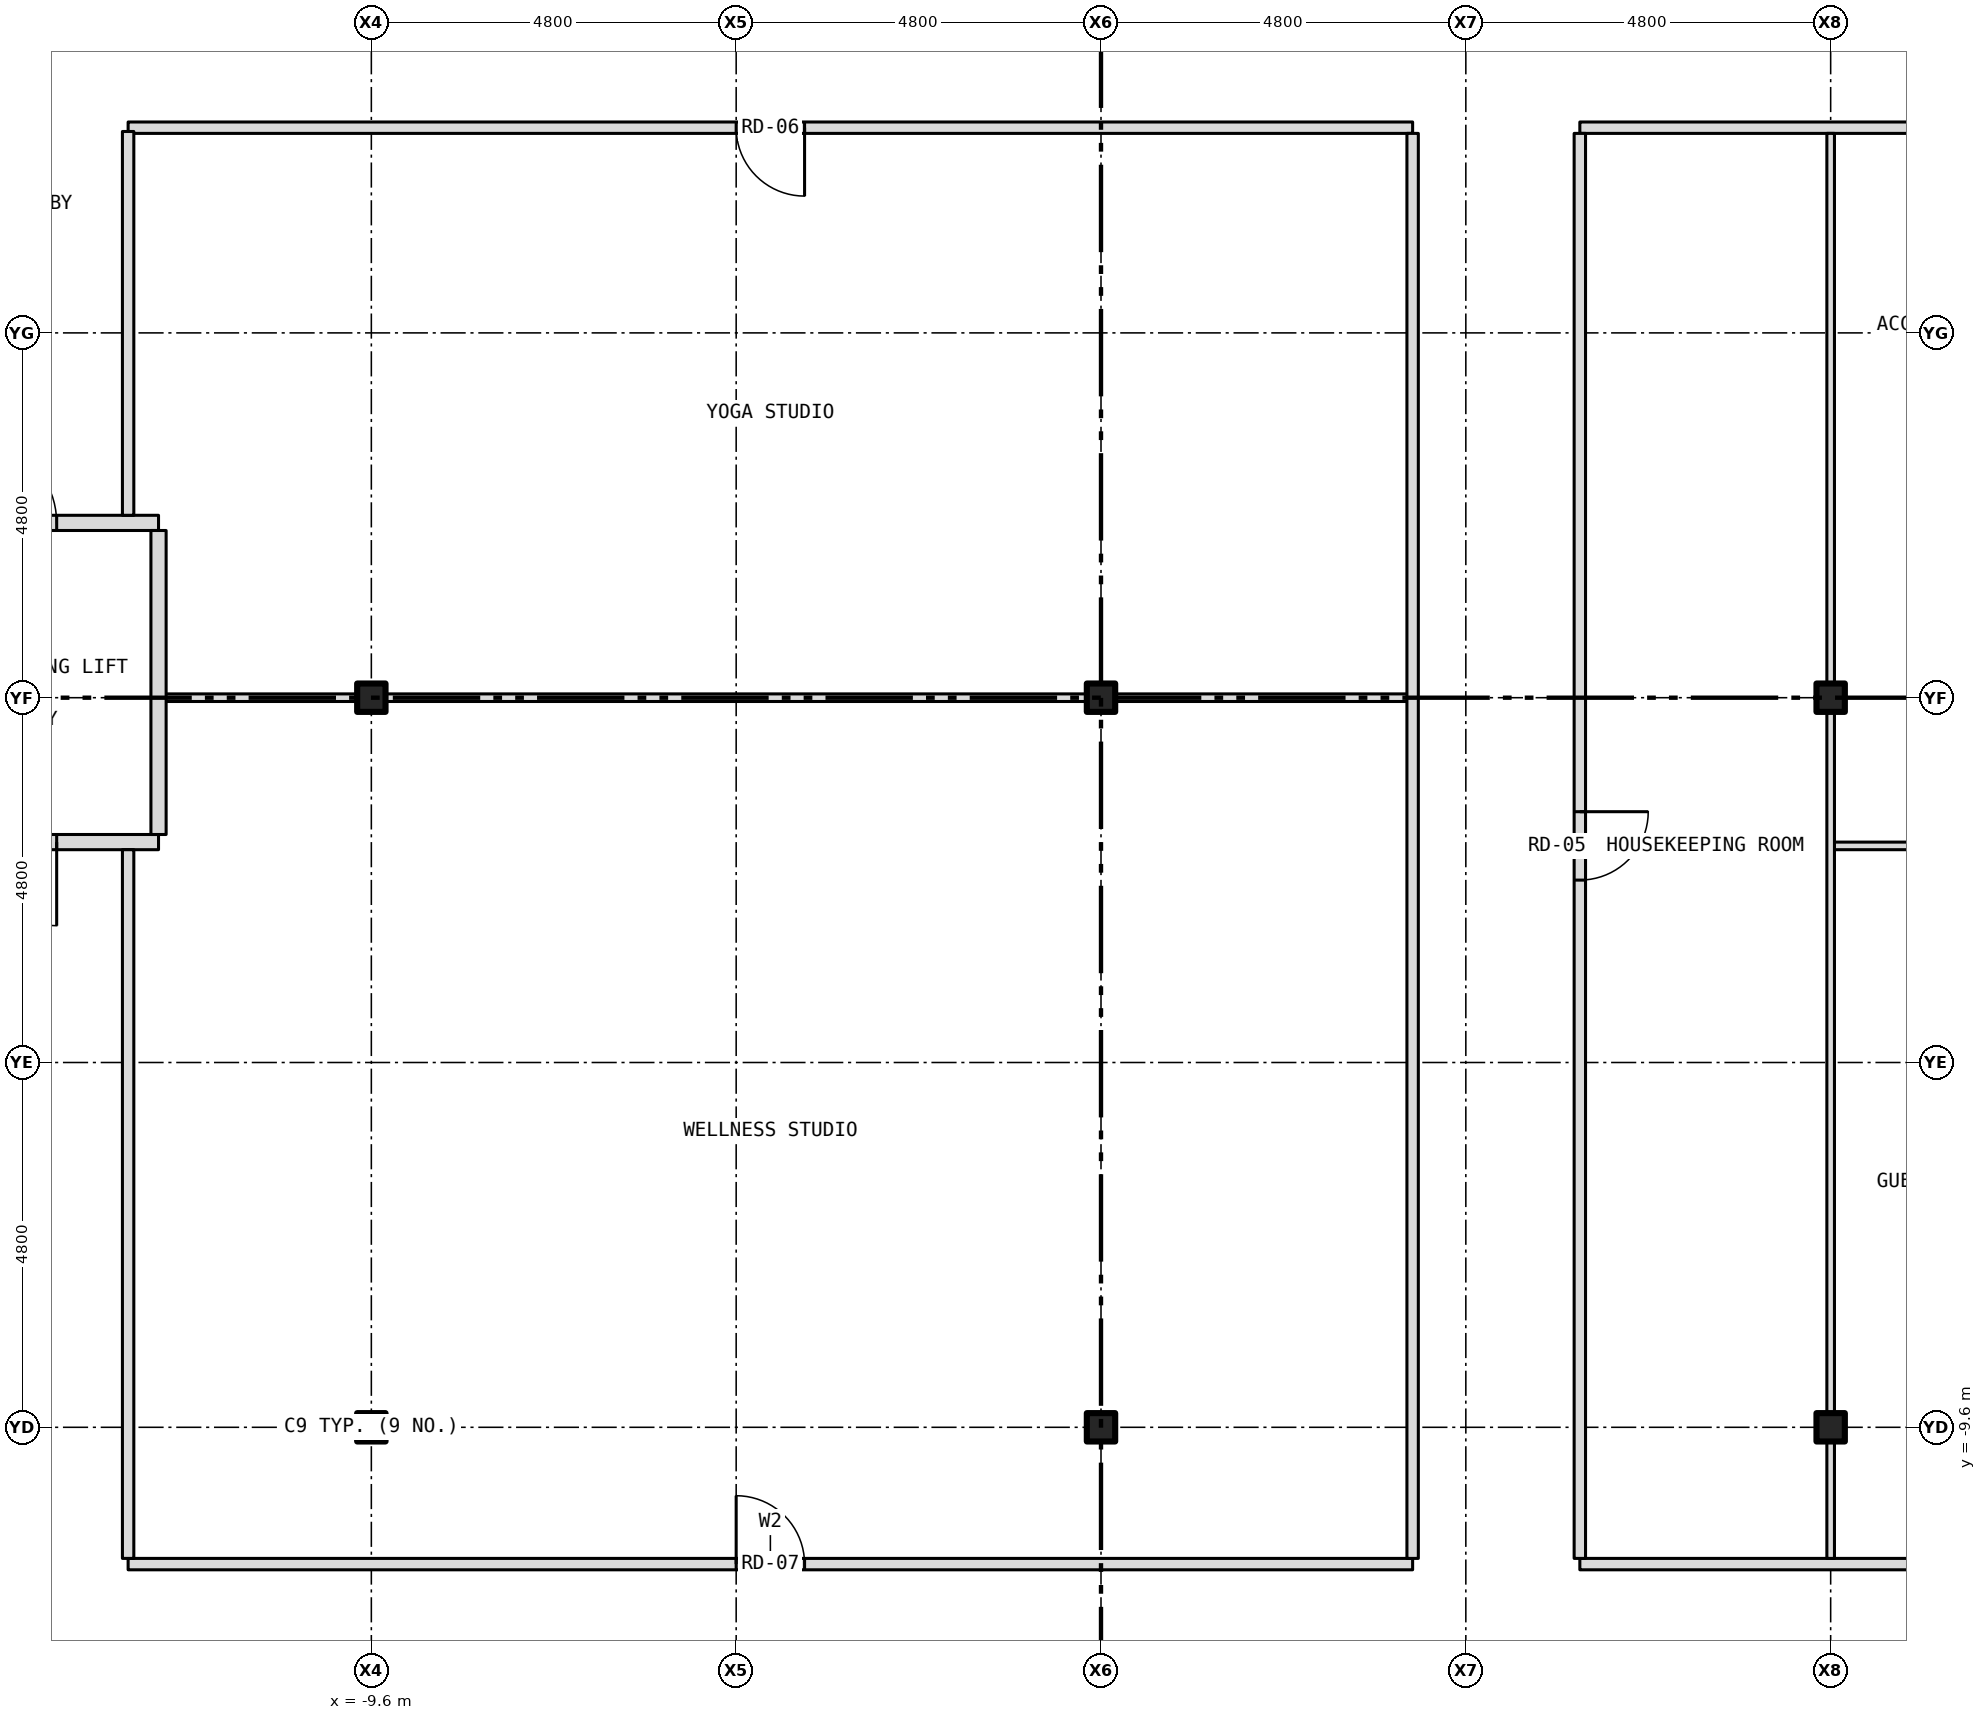
"""IFC4 building model, lengths in metres.
Left out: names, types, materials, properties, quantities, classifications, styles, units other than length and angle.
Written with IfcOpenShell. Run it as: python <this file> out.ifc"""

import sys

from ifc_helpers import new_model, si_unit, direction, frame, frame_2d, origin, origin_2d, place, context, subcontext, project, spatial, rectangle, i_section, extrude, element, fill, save


model = new_model("IFC4")
c1 = context("Model", 3, precision=1e-05, world=origin(), true_north=direction((0.0, 1.0)))
c2 = subcontext(c1, "Body", "Model", "MODEL_VIEW")
j1 = project(units=[si_unit("LENGTHUNIT", "METRE"), si_unit("PLANEANGLEUNIT", "RADIAN")], contexts=[c1])
p1 = place(None, origin())
s1 = spatial("IfcSite", under=j1, at=p1, CompositionType="ELEMENT")
p2 = place(p1, origin())
s2 = spatial("IfcBuilding", under=s1, at=p2, CompositionType="ELEMENT")
p3 = place(p2, frame((0.0, 0.0, 179.5)))
s3 = spatial("IfcBuildingStorey", under=s2, at=p3, CompositionType="ELEMENT", Elevation=179.5)
for number, where, z_axis, x_axis in (
    (1, (-9.6, -9.6, -0.15), (0.0, 0.0, 1.0), (1.0, 0.0, 0.0)),
    (2, (-9.6, 0.0, -0.15), (0.0, 0.0, 1.0), (1.0, 0.0, 0.0)),
    (3, (0.0, -9.6, -0.15), (0.0, 0.0, 1.0), (1.0, 0.0, 0.0)),
    (4, (0.0, 0.0, -0.15), (0.0, 0.0, 1.0), (1.0, 0.0, 0.0)),
    (5, (9.6, -9.6, -0.15), (0.0, 0.0, 1.0), (1.0, 0.0, 0.0)),
    (6, (9.6, 0.0, -0.15), (0.0, 0.0, 1.0), (1.0, 0.0, 0.0)),
):
    element("IfcColumn", number, at=place(p3, frame(where, z_axis=z_axis, x_axis=x_axis)), inside=s3, PredefinedType="COLUMN", context=c2, shape_type="SweptSolid", body=[
        extrude(i_section(OverallWidth=0.373, OverallDepth=0.373, WebThickness=0.016, FlangeThickness=0.026, at=origin_2d()), origin(), (0.0, 0.0, 1.0), 3.5),
    ])
p4 = place(p3, frame((-12.8, -11.4, 0.0), z_axis=(0.0, 0.0, 1.0), x_axis=(1.0, 0.0, 0.0)))
e7 = element("IfcWall", 7, at=p4, inside=s3, PredefinedType="PARTITIONING", context=c2, shape_type="SweptSolid", body=[
    extrude(rectangle(XDim=16.9, YDim=0.15, at=frame_2d((8.45, 0.0))), origin(), (0.0, 0.0, 1.0), 3.35),
])
p5 = place(p4, frame((8.0, 0.0, 0.0)))
e8 = element("IfcOpeningElement", 8, at=p5, cuts=e7, PredefinedType="OPENING", context=c2, shape_type="SweptSolid", body=[
    extrude(rectangle(XDim=0.9, YDim=2.1, at=frame_2d((0.45, 1.05))), frame((0.0, 0.087, 0.0), z_axis=(0.0, -1.0, 0.0), x_axis=(1.0, 0.0, 0.0)), (0.0, 0.0, 1.0), 0.174),
])
p6 = place(p3, frame((6.3, -11.4, 0.0), z_axis=(0.0, 0.0, 1.0), x_axis=(1.0, 0.0, 0.0)))
e9 = element("IfcWall", 9, at=p6, inside=s3, PredefinedType="PARTITIONING", context=c2, shape_type="SweptSolid", body=[
    extrude(rectangle(XDim=6.5, YDim=0.15, at=frame_2d((3.25, 0.0))), origin(), (0.0, 0.0, 1.0), 3.35),
])
p7 = place(p3, frame((9.6, -1.95, 0.0), z_axis=(0.0, 0.0, 1.0), x_axis=(1.0, 0.0, 0.0)))
e10 = element("IfcWall", 10, at=p7, inside=s3, PredefinedType="PARTITIONING", context=c2, shape_type="SweptSolid", body=[
    extrude(rectangle(XDim=3.2, YDim=0.1, at=frame_2d((1.6, 0.0))), origin(), (0.0, 0.0, 1.0), 3.35),
])
p8 = place(p3, frame((-15.68, -1.9, 0.0), z_axis=(0.0, 0.0, 1.0), x_axis=(1.0, 0.0, 0.0)))
e11 = element("IfcWall", 11, at=p8, inside=s3, PredefinedType="PARTITIONING", context=c2, shape_type="SweptSolid", body=[
    extrude(rectangle(XDim=3.28, YDim=0.2, at=frame_2d((1.64, 0.0))), origin(), (0.0, 0.0, 1.0), 3.35),
])
p9 = place(p8, frame((0.84, 0.0, 0.0)))
e12 = element("IfcOpeningElement", 12, at=p9, cuts=e11, PredefinedType="OPENING", context=c2, shape_type="SweptSolid", body=[
    extrude(rectangle(XDim=1.1, YDim=2.1, at=frame_2d((0.55, 1.05))), frame((0.0, 0.112, 0.0), z_axis=(0.0, -1.0, 0.0), x_axis=(1.0, 0.0, 0.0)), (0.0, 0.0, 1.0), 0.224),
])
p10 = place(p3, frame((-12.4, 0.0, 0.0), z_axis=(0.0, 0.0, 1.0), x_axis=(1.0, 0.0, 0.0)))
e13 = element("IfcWall", 13, at=p10, inside=s3, PredefinedType="PARTITIONING", context=c2, shape_type="SweptSolid", body=[
    extrude(rectangle(XDim=2.613, YDim=0.1, at=frame_2d((1.306, 0.0))), origin(), (0.0, 0.0, 1.0), 2.728),
])
p11 = place(p3, frame((-9.787, 0.0, 0.0), z_axis=(0.0, 0.0, 1.0), x_axis=(1.0, 0.0, 0.0)))
e14 = element("IfcWall", 14, at=p11, inside=s3, PredefinedType="PARTITIONING", context=c2, shape_type="SweptSolid", body=[
    extrude(rectangle(XDim=0.374, YDim=0.1, at=frame_2d((0.187, 0.0))), origin(), (0.0, 0.0, 1.0), 3.35),
])
p12 = place(p3, frame((-9.413, 0.0, 0.0), z_axis=(0.0, 0.0, 1.0), x_axis=(1.0, 0.0, 0.0)))
e15 = element("IfcWall", 15, at=p12, inside=s3, PredefinedType="PARTITIONING", context=c2, shape_type="SweptSolid", body=[
    extrude(rectangle(XDim=9.226, YDim=0.1, at=frame_2d((4.613, 0.0))), origin(), (0.0, 0.0, 1.0), 2.728),
])
p13 = place(p3, frame((-0.187, 0.0, 0.0), z_axis=(0.0, 0.0, 1.0), x_axis=(1.0, 0.0, 0.0)))
e16 = element("IfcWall", 16, at=p13, inside=s3, PredefinedType="PARTITIONING", context=c2, shape_type="SweptSolid", body=[
    extrude(rectangle(XDim=0.374, YDim=0.1, at=frame_2d((0.187, 0.0))), origin(), (0.0, 0.0, 1.0), 3.35),
])
p14 = place(p3, frame((0.187, 0.0, 0.0), z_axis=(0.0, 0.0, 1.0), x_axis=(1.0, 0.0, 0.0)))
e17 = element("IfcWall", 17, at=p14, inside=s3, PredefinedType="PARTITIONING", context=c2, shape_type="SweptSolid", body=[
    extrude(rectangle(XDim=3.913, YDim=0.1, at=frame_2d((1.957, 0.0))), origin(), (0.0, 0.0, 1.0), 2.728),
])
p15 = place(p3, frame((-15.68, 2.3, 0.0), z_axis=(0.0, 0.0, 1.0), x_axis=(1.0, 0.0, 0.0)))
e18 = element("IfcWall", 18, at=p15, inside=s3, PredefinedType="PARTITIONING", context=c2, shape_type="SweptSolid", body=[
    extrude(rectangle(XDim=3.28, YDim=0.2, at=frame_2d((1.64, 0.0))), origin(), (0.0, 0.0, 1.0), 3.35),
])
p16 = place(p15, frame((0.84, 0.0, 0.0)))
e19 = element("IfcOpeningElement", 19, at=p16, cuts=e18, PredefinedType="OPENING", context=c2, shape_type="SweptSolid", body=[
    extrude(rectangle(XDim=1.1, YDim=2.1, at=frame_2d((0.55, 1.05))), frame((0.0, 0.112, 0.0), z_axis=(0.0, -1.0, 0.0), x_axis=(1.0, 0.0, 0.0)), (0.0, 0.0, 1.0), 0.224),
])
p17 = place(p3, frame((-12.8, 7.5, 0.0), z_axis=(0.0, 0.0, 1.0), x_axis=(1.0, 0.0, 0.0)))
e20 = element("IfcWall", 20, at=p17, inside=s3, PredefinedType="PARTITIONING", context=c2, shape_type="SweptSolid", body=[
    extrude(rectangle(XDim=16.9, YDim=0.15, at=frame_2d((8.45, 0.0))), origin(), (0.0, 0.0, 1.0), 3.35),
])
p18 = place(p17, frame((8.0, 0.0, 0.0)))
e21 = element("IfcOpeningElement", 21, at=p18, cuts=e20, PredefinedType="OPENING", context=c2, shape_type="SweptSolid", body=[
    extrude(rectangle(XDim=0.9, YDim=2.1, at=frame_2d((0.45, 1.05))), frame((0.0, 0.087, 0.0), z_axis=(0.0, -1.0, 0.0), x_axis=(1.0, 0.0, 0.0)), (0.0, 0.0, 1.0), 0.174),
])
p19 = place(p3, frame((6.3, 7.5, 0.0), z_axis=(0.0, 0.0, 1.0), x_axis=(1.0, 0.0, 0.0)))
e22 = element("IfcWall", 22, at=p19, inside=s3, PredefinedType="PARTITIONING", context=c2, shape_type="SweptSolid", body=[
    extrude(rectangle(XDim=6.5, YDim=0.15, at=frame_2d((3.25, 0.0))), origin(), (0.0, 0.0, 1.0), 3.35),
])
p20 = place(p3, frame((-12.8, -11.325, 0.0), z_axis=(0.0, 0.0, 1.0), x_axis=(0.0, 1.0, 0.0)))
e23 = element("IfcWall", 23, at=p20, inside=s3, PredefinedType="PARTITIONING", context=c2, shape_type="SweptSolid", body=[
    extrude(rectangle(XDim=9.325, YDim=0.15, at=frame_2d((4.663, 0.0))), origin(), (0.0, 0.0, 1.0), 3.35),
])
p21 = place(p3, frame((-12.8, 2.4, 0.0), z_axis=(0.0, 0.0, 1.0), x_axis=(0.0, 1.0, 0.0)))
e24 = element("IfcWall", 24, at=p21, inside=s3, PredefinedType="PARTITIONING", context=c2, shape_type="SweptSolid", body=[
    extrude(rectangle(XDim=5.05, YDim=0.15, at=frame_2d((2.525, 0.0))), origin(), (0.0, 0.0, 1.0), 3.35),
])
p22 = place(p3, frame((-12.4, -1.8, 0.0), z_axis=(0.0, 0.0, 1.0), x_axis=(0.0, 1.0, 0.0)))
e25 = element("IfcWall", 25, at=p22, inside=s3, PredefinedType="PARTITIONING", context=c2, shape_type="SweptSolid", body=[
    extrude(rectangle(XDim=4.0, YDim=0.2, at=frame_2d((2.0, 0.0))), origin(), (0.0, 0.0, 1.0), 3.35),
])
p23 = place(p3, frame((4.1, -11.325, 0.0), z_axis=(0.0, 0.0, 1.0), x_axis=(0.0, 1.0, 0.0)))
e26 = element("IfcWall", 26, at=p23, inside=s3, PredefinedType="PARTITIONING", context=c2, shape_type="SweptSolid", body=[
    extrude(rectangle(XDim=18.75, YDim=0.15, at=frame_2d((9.375, 0.0))), origin(), (0.0, 0.0, 1.0), 3.35),
])
p24 = place(p3, frame((6.3, -11.325, 0.0), z_axis=(0.0, 0.0, 1.0), x_axis=(0.0, 1.0, 0.0)))
e27 = element("IfcWall", 27, at=p24, inside=s3, PredefinedType="PARTITIONING", context=c2, shape_type="SweptSolid", body=[
    extrude(rectangle(XDim=18.75, YDim=0.15, at=frame_2d((9.375, 0.0))), origin(), (0.0, 0.0, 1.0), 3.35),
])
p25 = place(p24, frame((8.925, 0.0, 0.0)))
e28 = element("IfcOpeningElement", 28, at=p25, cuts=e27, PredefinedType="OPENING", context=c2, shape_type="SweptSolid", body=[
    extrude(rectangle(XDim=0.9, YDim=2.1, at=frame_2d((0.45, 1.05))), frame((0.0, 0.087, 0.0), z_axis=(0.0, -1.0, 0.0), x_axis=(1.0, 0.0, 0.0)), (0.0, 0.0, 1.0), 0.174),
])
p26 = place(p3, frame((9.6, -11.325, 0.0), z_axis=(0.0, 0.0, 1.0), x_axis=(0.0, 1.0, 0.0)))
e29 = element("IfcWall", 29, at=p26, inside=s3, PredefinedType="PARTITIONING", context=c2, shape_type="SweptSolid", body=[
    extrude(rectangle(XDim=1.538, YDim=0.1, at=frame_2d((0.769, 0.0))), origin(), (0.0, 0.0, 1.0), 2.728),
])
p27 = place(p3, frame((9.6, -9.787, 0.0), z_axis=(0.0, 0.0, 1.0), x_axis=(0.0, 1.0, 0.0)))
e30 = element("IfcWall", 30, at=p27, inside=s3, PredefinedType="PARTITIONING", context=c2, shape_type="SweptSolid", body=[
    extrude(rectangle(XDim=0.374, YDim=0.1, at=frame_2d((0.187, 0.0))), origin(), (0.0, 0.0, 1.0), 3.35),
])
p28 = place(p3, frame((9.6, -9.413, 0.0), z_axis=(0.0, 0.0, 1.0), x_axis=(0.0, 1.0, 0.0)))
e31 = element("IfcWall", 31, at=p28, inside=s3, PredefinedType="PARTITIONING", context=c2, shape_type="SweptSolid", body=[
    extrude(rectangle(XDim=9.226, YDim=0.1, at=frame_2d((4.613, 0.0))), origin(), (0.0, 0.0, 1.0), 2.728),
])
p29 = place(p3, frame((9.6, -0.187, 0.0), z_axis=(0.0, 0.0, 1.0), x_axis=(0.0, 1.0, 0.0)))
e32 = element("IfcWall", 32, at=p29, inside=s3, PredefinedType="PARTITIONING", context=c2, shape_type="SweptSolid", body=[
    extrude(rectangle(XDim=0.374, YDim=0.1, at=frame_2d((0.187, 0.0))), origin(), (0.0, 0.0, 1.0), 3.35),
])
p30 = place(p3, frame((9.6, 0.187, 0.0), z_axis=(0.0, 0.0, 1.0), x_axis=(0.0, 1.0, 0.0)))
e33 = element("IfcWall", 33, at=p30, inside=s3, PredefinedType="PARTITIONING", context=c2, shape_type="SweptSolid", body=[
    extrude(rectangle(XDim=7.238, YDim=0.1, at=frame_2d((3.619, 0.0))), origin(), (0.0, 0.0, 1.0), 2.728),
])
p31 = place(p16, origin())
e34 = element("IfcDoor", 34, at=p31, inside=s3, OperationType="SINGLE_SWING_LEFT", PredefinedType="DOOR", context=c2, shape_type="SweptSolid", body=[
    extrude(rectangle(XDim=1.1, YDim=2.1, at=frame_2d((0.55, 1.05))), frame((0.0, 0.025, 0.0), z_axis=(0.0, -1.0, 0.0), x_axis=(1.0, 0.0, 0.0)), (0.0, 0.0, 1.0), 0.05),
])
fill(e19, e34)
p32 = place(p9, origin())
e35 = element("IfcDoor", 35, at=p32, inside=s3, OperationType="SINGLE_SWING_RIGHT", PredefinedType="DOOR", context=c2, shape_type="SweptSolid", body=[
    extrude(rectangle(XDim=1.1, YDim=2.1, at=frame_2d((0.55, 1.05))), frame((0.0, 0.025, 0.0), z_axis=(0.0, -1.0, 0.0), x_axis=(1.0, 0.0, 0.0)), (0.0, 0.0, 1.0), 0.05),
])
fill(e12, e35)
p33 = place(p25, origin())
e36 = element("IfcDoor", 36, at=p33, inside=s3, OperationType="SINGLE_SWING_RIGHT", PredefinedType="DOOR", context=c2, shape_type="SweptSolid", body=[
    extrude(rectangle(XDim=0.9, YDim=2.1, at=frame_2d((0.45, 1.05))), frame((0.0, 0.025, 0.0), z_axis=(0.0, -1.0, 0.0), x_axis=(1.0, 0.0, 0.0)), (0.0, 0.0, 1.0), 0.05),
])
fill(e28, e36)
p34 = place(p18, origin())
e37 = element("IfcDoor", 37, at=p34, inside=s3, OperationType="SINGLE_SWING_RIGHT", PredefinedType="DOOR", context=c2, shape_type="SweptSolid", body=[
    extrude(rectangle(XDim=0.9, YDim=2.1, at=frame_2d((0.45, 1.05))), frame((0.0, 0.025, 0.0), z_axis=(0.0, -1.0, 0.0), x_axis=(1.0, 0.0, 0.0)), (0.0, 0.0, 1.0), 0.05),
])
fill(e21, e37)
p35 = place(p5, origin())
e38 = element("IfcDoor", 38, at=p35, inside=s3, OperationType="SINGLE_SWING_LEFT", PredefinedType="DOOR", context=c2, shape_type="SweptSolid", body=[
    extrude(rectangle(XDim=0.9, YDim=2.1, at=frame_2d((0.45, 1.05))), frame((0.0, 0.025, 0.0), z_axis=(0.0, -1.0, 0.0), x_axis=(1.0, 0.0, 0.0)), (0.0, 0.0, 1.0), 0.05),
])
fill(e8, e38)
save(model, sys.argv[1])
